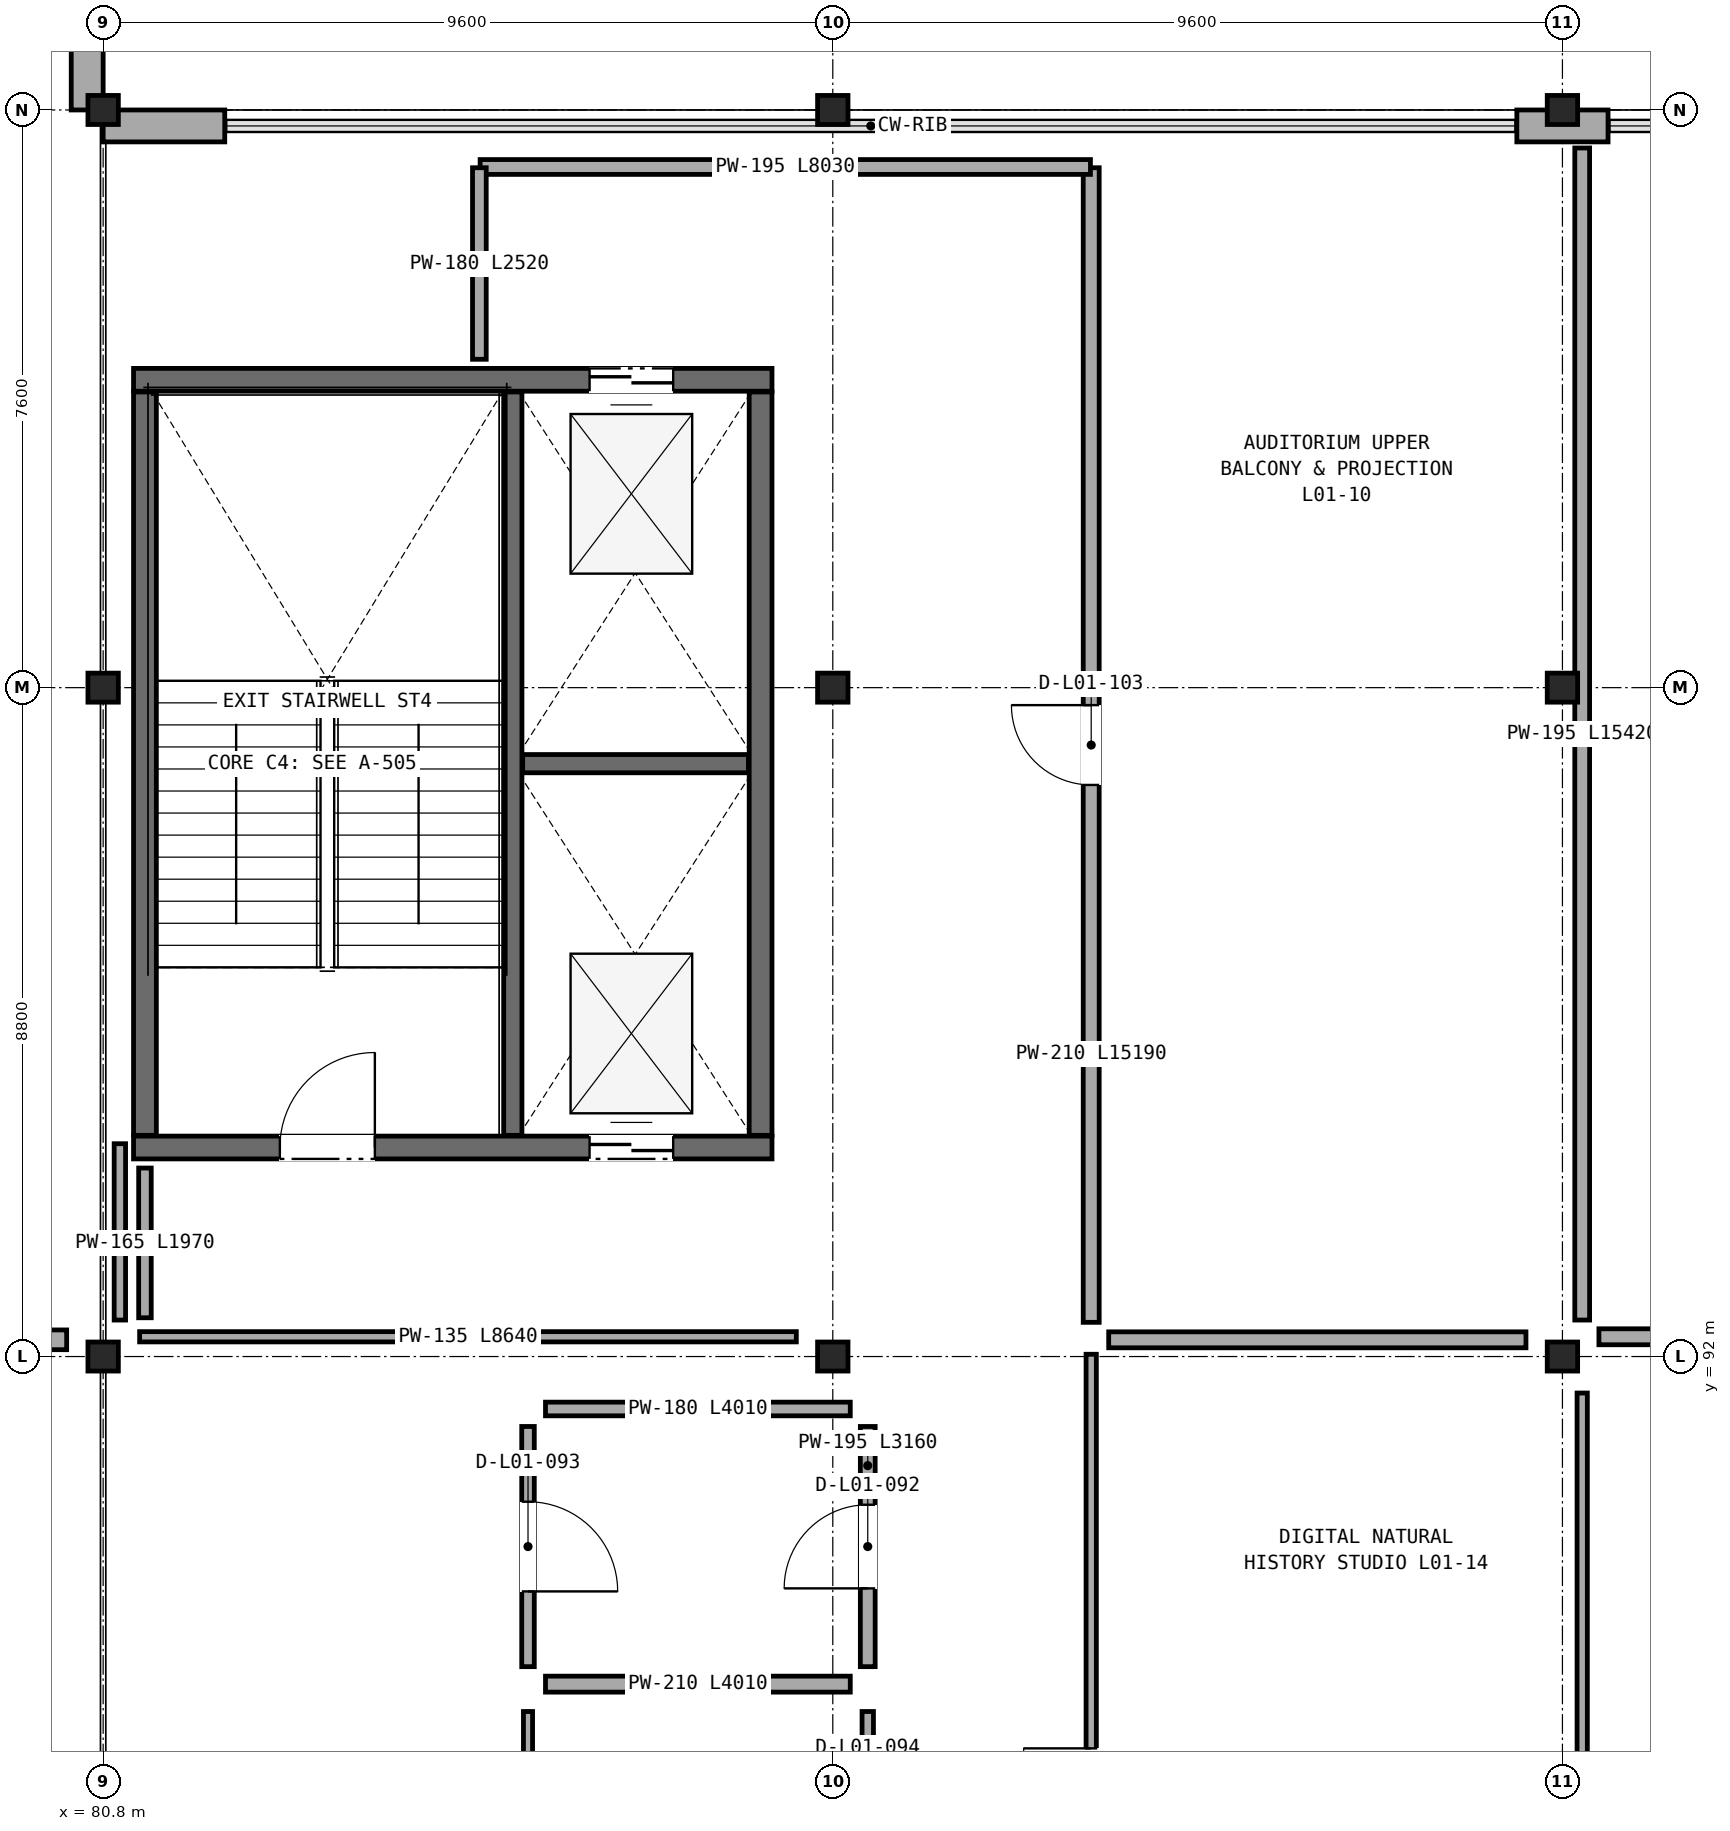
"""IFC4 building model, lengths in metres.
Left out: names, types, materials, properties, quantities, classifications, styles, units other than length and angle.
Written with IfcOpenShell. Run it as: python <this file> out.ifc"""

import sys

from ifc_helpers import new_model, si_unit, direction, frame, frame_2d, origin, origin_2d, place, context, subcontext, project, spatial, rectangle, i_section, extrude, element, fill, save


model = new_model("IFC4")
c1 = context("Model", 3, precision=1e-05, world=origin(), true_north=direction((0.0, 1.0)))
c2 = subcontext(c1, "Body", "Model", "MODEL_VIEW")
j1 = project(units=[si_unit("LENGTHUNIT", "METRE"), si_unit("PLANEANGLEUNIT", "RADIAN")], contexts=[c1])
p1 = place(None, origin())
s1 = spatial("IfcSite", under=j1, at=p1, CompositionType="ELEMENT")
p2 = place(p1, origin())
s2 = spatial("IfcBuilding", under=s1, at=p2, CompositionType="ELEMENT")
p3 = place(p2, frame((0.0, 0.0, 5.6)))
s3 = spatial("IfcBuildingStorey", under=s2, at=p3, CompositionType="ELEMENT", Elevation=5.6)
for number, where, z_axis, x_axis in (
    (1, (90.4, 92.0, 0.0), (0.0, 0.0, 1.0), (1.0, 0.0, 0.0)),
    (2, (90.4, 100.8, 0.0), (0.0, 0.0, 1.0), (1.0, 0.0, 0.0)),
    (3, (90.4, 108.4, 0.0), (0.0, 0.0, 1.0), (1.0, 0.0, 0.0)),
    (4, (100.0, 92.0, 0.0), (0.0, 0.0, 1.0), (1.0, 0.0, 0.0)),
    (5, (100.0, 100.8, 0.0), (0.0, 0.0, 1.0), (1.0, 0.0, 0.0)),
    (6, (100.0, 108.4, 0.0), (0.0, 0.0, 1.0), (1.0, 0.0, 0.0)),
    (7, (80.8, 92.0, 0.0), (0.0, 0.0, 1.0), (1.0, 0.0, 0.0)),
    (8, (80.8, 100.8, 0.0), (0.0, 0.0, 1.0), (1.0, 0.0, 0.0)),
    (9, (80.8, 108.4, 0.0), (0.0, 0.0, 1.0), (1.0, 0.0, 0.0)),
):
    element("IfcColumn", number, at=place(p3, frame(where, z_axis=z_axis, x_axis=x_axis)), inside=s3, PredefinedType="COLUMN", context=c2, shape_type="SweptSolid", body=[
        extrude(i_section(OverallWidth=0.4, OverallDepth=0.382, WebThickness=0.025, FlangeThickness=0.036, at=origin_2d()), origin(), (0.0, 0.0, 1.0), 4.5),
    ])
p4 = place(p3, frame((100.6, 108.19, 0.0), z_axis=(0.0, 0.0, 1.0), x_axis=(-1.0, 0.0, 0.0)))
e10 = element("IfcWall", 10, at=p4, inside=s3, PredefinedType="SOLIDWALL", context=c2, shape_type="SweptSolid", body=[
    extrude(rectangle(XDim=1.2, YDim=0.42, at=frame_2d((0.6, 0.0))), origin(), (0.0, 0.0, 1.0), 3.628),
])
p5 = place(p3, frame((82.4, 108.19, 0.0), z_axis=(0.0, 0.0, 1.0), x_axis=(-1.0, 0.0, 0.0)))
e11 = element("IfcWall", 11, at=p5, inside=s3, PredefinedType="SOLIDWALL", context=c2, shape_type="SweptSolid", body=[
    extrude(rectangle(XDim=1.6, YDim=0.42, at=frame_2d((0.8, 0.0))), origin(), (0.0, 0.0, 1.0), 3.558),
])
p6 = place(p3, frame((80.59, 108.4, 0.0), z_axis=(0.0, 0.0, 1.0), x_axis=(0.0, 1.0, 0.0)))
e12 = element("IfcWall", 12, at=p6, inside=s3, PredefinedType="SOLIDWALL", context=c2, shape_type="SweptSolid", body=[
    extrude(rectangle(XDim=6.8, YDim=0.42, at=frame_2d((3.4, 0.0))), origin(), (0.0, 0.0, 1.0), 3.558),
])
p7 = place(p3, frame((81.2, 94.75, 0.0), z_axis=(0.0, 0.0, 1.0), x_axis=(1.0, 0.0, 0.0)))
e13 = element("IfcWall", 13, at=p7, inside=s3, PredefinedType="SHEAR", context=c2, shape_type="SweptSolid", body=[
    extrude(rectangle(XDim=8.4, YDim=0.3, at=frame_2d((4.2, 0.0))), origin(), (0.0, 0.0, 1.0), 4.245),
])
p8 = place(p7, frame((1.925, 0.0, 0.0)))
e14 = element("IfcOpeningElement", 14, at=p8, cuts=e13, PredefinedType="OPENING", context=c2, shape_type="SweptSolid", body=[
    extrude(rectangle(XDim=1.25, YDim=2.2, at=frame_2d((0.625, 1.1))), frame((0.0, 0.16, 0.0), z_axis=(0.0, -1.0, 0.0), x_axis=(1.0, 0.0, 0.0)), (0.0, 0.0, 1.0), 0.32),
])
p9 = place(p7, frame((6.0, 0.0, 0.0)))
e15 = element("IfcOpeningElement", 15, at=p9, cuts=e13, PredefinedType="OPENING", context=c2, shape_type="SweptSolid", body=[
    extrude(rectangle(XDim=1.1, YDim=2.2, at=frame_2d((0.55, 1.1))), frame((0.0, 0.16, 0.0), z_axis=(0.0, -1.0, 0.0), x_axis=(1.0, 0.0, 0.0)), (0.0, 0.0, 1.0), 0.32),
])
p10 = place(p3, frame((89.6, 104.85, 0.0), z_axis=(0.0, 0.0, 1.0), x_axis=(-1.0, 0.0, 0.0)))
e16 = element("IfcWall", 16, at=p10, inside=s3, PredefinedType="SHEAR", context=c2, shape_type="SweptSolid", body=[
    extrude(rectangle(XDim=8.4, YDim=0.3, at=frame_2d((4.2, 0.0))), origin(), (0.0, 0.0, 1.0), 4.245),
])
p11 = place(p10, frame((1.3, 0.0, 0.0)))
e17 = element("IfcOpeningElement", 17, at=p11, cuts=e16, PredefinedType="OPENING", context=c2, shape_type="SweptSolid", body=[
    extrude(rectangle(XDim=1.1, YDim=2.2, at=frame_2d((0.55, 1.1))), frame((0.0, 0.16, 0.0), z_axis=(0.0, -1.0, 0.0), x_axis=(1.0, 0.0, 0.0)), (0.0, 0.0, 1.0), 0.32),
])
for number, where, z_axis, x_axis in (
    (18, (89.45, 94.91, 0.0), (0.0, 0.0, 1.0), (0.0, 1.0, 0.0)),
    (19, (81.35, 104.69, 0.0), (0.0, 0.0, 1.0), (0.0, -1.0, 0.0)),
):
    element("IfcWall", number, at=place(p3, frame(where, z_axis=z_axis, x_axis=x_axis)), inside=s3, PredefinedType="SHEAR", context=c2, shape_type="SweptSolid", body=[
        extrude(rectangle(XDim=9.78, YDim=0.3, at=frame_2d((4.89, 0.0))), origin(), (0.0, 0.0, 1.0), 4.245),
    ])
p12 = place(p3, frame((86.19, 94.91, 0.0), z_axis=(0.0, 0.0, 1.0), x_axis=(0.0, 1.0, 0.0)))
e20 = element("IfcWall", 20, at=p12, inside=s3, PredefinedType="SOLIDWALL", context=c2, shape_type="SweptSolid", body=[
    extrude(rectangle(XDim=9.78, YDim=0.24, at=frame_2d((4.89, 0.0))), origin(), (0.0, 0.0, 1.0), 4.245),
])
p13 = place(p3, frame((86.32, 99.8, 0.0), z_axis=(0.0, 0.0, 1.0), x_axis=(1.0, 0.0, 0.0)))
e21 = element("IfcWall", 21, at=p13, inside=s3, PredefinedType="SOLIDWALL", context=c2, shape_type="SweptSolid", body=[
    extrude(rectangle(XDim=2.97, YDim=0.24, at=frame_2d((1.485, 0.0))), origin(), (0.0, 0.0, 1.0), 4.245),
])
p14 = place(p3, frame((90.63, 87.69, 0.0), z_axis=(0.0, 0.0, 1.0), x_axis=(-1.0, 0.0, 0.0)))
e22 = element("IfcWall", 22, at=p14, inside=s3, PredefinedType="PARTITIONING", context=c2, shape_type="SweptSolid", body=[
    extrude(rectangle(XDim=4.01, YDim=0.21, at=frame_2d((2.005, 0.0))), origin(), (0.0, 0.0, 1.0), 3.763),
])
p15 = place(p3, frame((90.86, 91.08, 0.0), z_axis=(0.0, 0.0, 1.0), x_axis=(0.0, -1.0, 0.0)))
e23 = element("IfcWall", 23, at=p15, inside=s3, PredefinedType="PARTITIONING", context=c2, shape_type="SweptSolid", body=[
    extrude(rectangle(XDim=3.16, YDim=0.195, at=frame_2d((1.58, 0.0))), origin(), (0.0, 0.0, 1.0), 4.13),
])
p16 = place(p15, frame((1.03, 0.0, 0.0)))
e24 = element("IfcOpeningElement", 24, at=p16, cuts=e23, PredefinedType="OPENING", context=c2, shape_type="SweptSolid", body=[
    extrude(rectangle(XDim=1.1, YDim=2.24, at=frame_2d((0.55, 1.12))), frame((0.0, 0.107, 0.0), z_axis=(0.0, -1.0, 0.0), x_axis=(1.0, 0.0, 0.0)), (0.0, 0.0, 1.0), 0.215),
])
p17 = place(p3, frame((86.62, 91.31, 0.0), z_axis=(0.0, 0.0, 1.0), x_axis=(1.0, 0.0, 0.0)))
e25 = element("IfcWall", 25, at=p17, inside=s3, PredefinedType="PARTITIONING", context=c2, shape_type="SweptSolid", body=[
    extrude(rectangle(XDim=4.01, YDim=0.18, at=frame_2d((2.005, 0.0))), origin(), (0.0, 0.0, 1.0), 3.763),
])
p18 = place(p3, frame((86.39, 87.92, 0.0), z_axis=(0.0, 0.0, 1.0), x_axis=(0.0, 1.0, 0.0)))
e26 = element("IfcWall", 26, at=p18, inside=s3, PredefinedType="PARTITIONING", context=c2, shape_type="SweptSolid", body=[
    extrude(rectangle(XDim=3.16, YDim=0.165, at=frame_2d((1.58, 0.0))), origin(), (0.0, 0.0, 1.0), 4.13),
])
p19 = place(p18, frame((0.99, 0.0, 0.0)))
e27 = element("IfcOpeningElement", 27, at=p19, cuts=e26, PredefinedType="OPENING", context=c2, shape_type="SweptSolid", body=[
    extrude(rectangle(XDim=1.18, YDim=2.24, at=frame_2d((0.59, 1.12))), frame((0.0, 0.093, 0.0), z_axis=(0.0, -1.0, 0.0), x_axis=(1.0, 0.0, 0.0)), (0.0, 0.0, 1.0), 0.185),
])
p20 = place(p3, frame((90.86, 87.33, 0.0), z_axis=(0.0, 0.0, 1.0), x_axis=(0.0, -1.0, 0.0)))
e28 = element("IfcWall", 28, at=p20, inside=s3, PredefinedType="PARTITIONING", context=c2, shape_type="SweptSolid", body=[
    extrude(rectangle(XDim=3.16, YDim=0.15, at=frame_2d((1.58, 0.0))), origin(), (0.0, 0.0, 1.0), 4.13),
])
p21 = place(p20, frame((0.94, 0.0, 0.0)))
e29 = element("IfcOpeningElement", 29, at=p21, cuts=e28, PredefinedType="OPENING", context=c2, shape_type="SweptSolid", body=[
    extrude(rectangle(XDim=1.28, YDim=2.24, at=frame_2d((0.64, 1.12))), frame((0.0, 0.085, 0.0), z_axis=(0.0, -1.0, 0.0), x_axis=(1.0, 0.0, 0.0)), (0.0, 0.0, 1.0), 0.17),
])
p22 = place(p3, frame((86.39, 84.17, 0.0), z_axis=(0.0, 0.0, 1.0), x_axis=(0.0, 1.0, 0.0)))
e30 = element("IfcWall", 30, at=p22, inside=s3, PredefinedType="PARTITIONING", context=c2, shape_type="SweptSolid", body=[
    extrude(rectangle(XDim=3.16, YDim=0.12, at=frame_2d((1.58, 0.0))), origin(), (0.0, 0.0, 1.0), 4.13),
])
p23 = place(p3, frame((81.28, 92.26, 0.0), z_axis=(0.0, 0.0, 1.0), x_axis=(1.0, 0.0, 0.0)))
e31 = element("IfcWall", 31, at=p23, inside=s3, PredefinedType="PARTITIONING", context=c2, shape_type="SweptSolid", body=[
    extrude(rectangle(XDim=8.64, YDim=0.135, at=frame_2d((4.32, 0.0))), origin(), (0.0, 0.0, 1.0), 3.613),
])
p24 = place(p3, frame((93.8, 92.45, 0.0), z_axis=(0.0, 0.0, 1.0), x_axis=(0.0, 1.0, 0.0)))
e32 = element("IfcWall", 32, at=p24, inside=s3, PredefinedType="PARTITIONING", context=c2, shape_type="SweptSolid", body=[
    extrude(rectangle(XDim=15.19, YDim=0.21, at=frame_2d((7.595, 0.0))), origin(), (0.0, 0.0, 1.0), 3.613),
])
p25 = place(p24, frame((7.07, 0.0, 0.0)))
e33 = element("IfcOpeningElement", 33, at=p25, cuts=e32, PredefinedType="OPENING", context=c2, shape_type="SweptSolid", body=[
    extrude(rectangle(XDim=1.05, YDim=2.15, at=frame_2d((0.525, 1.075))), frame((0.0, 0.115, 0.0), z_axis=(0.0, -1.0, 0.0), x_axis=(1.0, 0.0, 0.0)), (0.0, 0.0, 1.0), 0.23),
])
p26 = place(p3, frame((93.79, 107.65, 0.0), z_axis=(0.0, 0.0, 1.0), x_axis=(-1.0, 0.0, 0.0)))
e34 = element("IfcWall", 34, at=p26, inside=s3, PredefinedType="PARTITIONING", context=c2, shape_type="SweptSolid", body=[
    extrude(rectangle(XDim=8.03, YDim=0.195, at=frame_2d((4.015, 0.0))), origin(), (0.0, 0.0, 1.0), 3.763),
])
p27 = place(p3, frame((85.75, 107.64, 0.0), z_axis=(0.0, 0.0, 1.0), x_axis=(0.0, -1.0, 0.0)))
e35 = element("IfcWall", 35, at=p27, inside=s3, PredefinedType="PARTITIONING", context=c2, shape_type="SweptSolid", body=[
    extrude(rectangle(XDim=2.52, YDim=0.18, at=frame_2d((1.26, 0.0))), origin(), (0.0, 0.0, 1.0), 4.13),
])
p28 = place(p3, frame((81.35, 94.48, 0.0), z_axis=(0.0, 0.0, 1.0), x_axis=(0.0, -1.0, 0.0)))
e36 = element("IfcWall", 36, at=p28, inside=s3, PredefinedType="PARTITIONING", context=c2, shape_type="SweptSolid", body=[
    extrude(rectangle(XDim=1.97, YDim=0.165, at=frame_2d((0.985, 0.0))), origin(), (0.0, 0.0, 1.0), 4.13),
])
p29 = place(p3, frame((81.02, 92.48, 0.0), z_axis=(0.0, 0.0, 1.0), x_axis=(0.0, 1.0, 0.0)))
e37 = element("IfcWall", 37, at=p29, inside=s3, PredefinedType="PARTITIONING", context=c2, shape_type="SweptSolid", body=[
    extrude(rectangle(XDim=2.32, YDim=0.15, at=frame_2d((1.16, 0.0))), origin(), (0.0, 0.0, 1.0), 3.693),
])
p30 = place(p3, frame((93.8, 79.88, 0.0), z_axis=(0.0, 0.0, 1.0), x_axis=(0.0, 1.0, 0.0)))
e38 = element("IfcWall", 38, at=p30, inside=s3, PredefinedType="PARTITIONING", context=c2, shape_type="SweptSolid", body=[
    extrude(rectangle(XDim=12.15, YDim=0.135, at=frame_2d((6.075, 0.0))), origin(), (0.0, 0.0, 1.0), 3.613),
])
p31 = place(p30, frame((5.185, 0.0, 0.0)))
e39 = element("IfcOpeningElement", 39, at=p31, cuts=e38, PredefinedType="OPENING", context=c2, shape_type="SweptSolid", body=[
    extrude(rectangle(XDim=1.78, YDim=2.46, at=frame_2d((0.89, 1.23))), frame((0.0, 0.078, 0.0), z_axis=(0.0, -1.0, 0.0), x_axis=(1.0, 0.0, 0.0)), (0.0, 0.0, 1.0), 0.155),
])
p32 = place(p3, frame((99.52, 92.22, 0.0), z_axis=(0.0, 0.0, 1.0), x_axis=(-1.0, 0.0, 0.0)))
e40 = element("IfcWall", 40, at=p32, inside=s3, PredefinedType="PARTITIONING", context=c2, shape_type="SweptSolid", body=[
    extrude(rectangle(XDim=5.49, YDim=0.21, at=frame_2d((2.745, 0.0))), origin(), (0.0, 0.0, 1.0), 3.613),
])
p33 = place(p3, frame((100.26, 107.9, 0.0), z_axis=(0.0, 0.0, 1.0), x_axis=(0.0, -1.0, 0.0)))
e41 = element("IfcWall", 41, at=p33, inside=s3, PredefinedType="PARTITIONING", context=c2, shape_type="SweptSolid", body=[
    extrude(rectangle(XDim=15.42, YDim=0.195, at=frame_2d((7.71, 0.0))), origin(), (0.0, 0.0, 1.0), 3.613),
])
p34 = place(p3, frame((100.26, 91.52, 0.0), z_axis=(0.0, 0.0, 1.0), x_axis=(0.0, -1.0, 0.0)))
e42 = element("IfcWall", 42, at=p34, inside=s3, PredefinedType="PARTITIONING", context=c2, shape_type="SweptSolid", body=[
    extrude(rectangle(XDim=11.64, YDim=0.135, at=frame_2d((5.82, 0.0))), origin(), (0.0, 0.0, 1.0), 3.613),
])
p35 = place(p3, frame((100.48, 92.26, 0.0), z_axis=(0.0, 0.0, 1.0), x_axis=(1.0, 0.0, 0.0)))
e43 = element("IfcWall", 43, at=p35, inside=s3, PredefinedType="PARTITIONING", context=c2, shape_type="SweptSolid", body=[
    extrude(rectangle(XDim=5.49, YDim=0.21, at=frame_2d((2.745, 0.0))), origin(), (0.0, 0.0, 1.0), 3.613),
])
p36 = place(p3, frame((80.32, 92.22, 0.0), z_axis=(0.0, 0.0, 1.0), x_axis=(-1.0, 0.0, 0.0)))
e44 = element("IfcWall", 44, at=p36, inside=s3, PredefinedType="SOLIDWALL", context=c2, shape_type="SweptSolid", body=[
    extrude(rectangle(XDim=8.64, YDim=0.26, at=frame_2d((4.32, 0.0))), origin(), (0.0, 0.0, 1.0), 3.543),
])
p37 = place(p8, origin())
e45 = element("IfcDoor", 45, at=p37, inside=s3, OperationType="SINGLE_SWING_RIGHT", PredefinedType="DOOR", context=c2, shape_type="SweptSolid", body=[
    extrude(rectangle(XDim=1.25, YDim=2.2, at=frame_2d((0.625, 1.1))), frame((0.0, 0.025, 0.0), z_axis=(0.0, -1.0, 0.0), x_axis=(1.0, 0.0, 0.0)), (0.0, 0.0, 1.0), 0.05),
])
fill(e14, e45)
p38 = place(p9, origin())
e46 = element("IfcDoor", 46, at=p38, inside=s3, OperationType="DOUBLE_DOOR_SLIDING", PredefinedType="DOOR", context=c2, shape_type="SweptSolid", body=[
    extrude(rectangle(XDim=1.1, YDim=2.2, at=frame_2d((0.55, 1.1))), frame((0.0, 0.025, 0.0), z_axis=(0.0, -1.0, 0.0), x_axis=(1.0, 0.0, 0.0)), (0.0, 0.0, 1.0), 0.05),
])
fill(e15, e46)
p39 = place(p11, origin())
e47 = element("IfcDoor", 47, at=p39, inside=s3, OperationType="DOUBLE_DOOR_SLIDING", PredefinedType="DOOR", context=c2, shape_type="SweptSolid", body=[
    extrude(rectangle(XDim=1.1, YDim=2.2, at=frame_2d((0.55, 1.1))), frame((0.0, 0.025, 0.0), z_axis=(0.0, -1.0, 0.0), x_axis=(1.0, 0.0, 0.0)), (0.0, 0.0, 1.0), 0.05),
])
fill(e17, e47)
p40 = place(p16, frame((1.1, 0.0, 0.0), z_axis=(0.0, 0.0, 1.0), x_axis=(-1.0, 0.0, 0.0)))
e48 = element("IfcDoor", 48, at=p40, inside=s3, OperationType="SINGLE_SWING_RIGHT", PredefinedType="DOOR", context=c2, shape_type="SweptSolid", body=[
    extrude(rectangle(XDim=1.1, YDim=2.24, at=frame_2d((0.55, 1.12))), frame((0.0, 0.025, 0.0), z_axis=(0.0, -1.0, 0.0), x_axis=(1.0, 0.0, 0.0)), (0.0, 0.0, 1.0), 0.05),
])
fill(e24, e48)
p41 = place(p19, frame((1.18, 0.0, 0.0), z_axis=(0.0, 0.0, 1.0), x_axis=(-1.0, 0.0, 0.0)))
e49 = element("IfcDoor", 49, at=p41, inside=s3, OperationType="SINGLE_SWING_LEFT", PredefinedType="DOOR", context=c2, shape_type="SweptSolid", body=[
    extrude(rectangle(XDim=1.18, YDim=2.24, at=frame_2d((0.59, 1.12))), frame((0.0, 0.025, 0.0), z_axis=(0.0, -1.0, 0.0), x_axis=(1.0, 0.0, 0.0)), (0.0, 0.0, 1.0), 0.05),
])
fill(e27, e49)
p42 = place(p25, origin())
e50 = element("IfcDoor", 50, at=p42, inside=s3, OperationType="SINGLE_SWING_RIGHT", PredefinedType="DOOR", context=c2, shape_type="SweptSolid", body=[
    extrude(rectangle(XDim=1.05, YDim=2.15, at=frame_2d((0.525, 1.075))), frame((0.0, 0.025, 0.0), z_axis=(0.0, -1.0, 0.0), x_axis=(1.0, 0.0, 0.0)), (0.0, 0.0, 1.0), 0.05),
])
fill(e33, e50)
p43 = place(p31, origin())
e51 = element("IfcDoor", 51, at=p43, inside=s3, OperationType="DOUBLE_DOOR_SINGLE_SWING", PredefinedType="DOOR", context=c2, shape_type="SweptSolid", body=[
    extrude(rectangle(XDim=1.78, YDim=2.46, at=frame_2d((0.89, 1.23))), frame((0.0, 0.025, 0.0), z_axis=(0.0, -1.0, 0.0), x_axis=(1.0, 0.0, 0.0)), (0.0, 0.0, 1.0), 0.05),
])
fill(e39, e51)
save(model, sys.argv[1])
